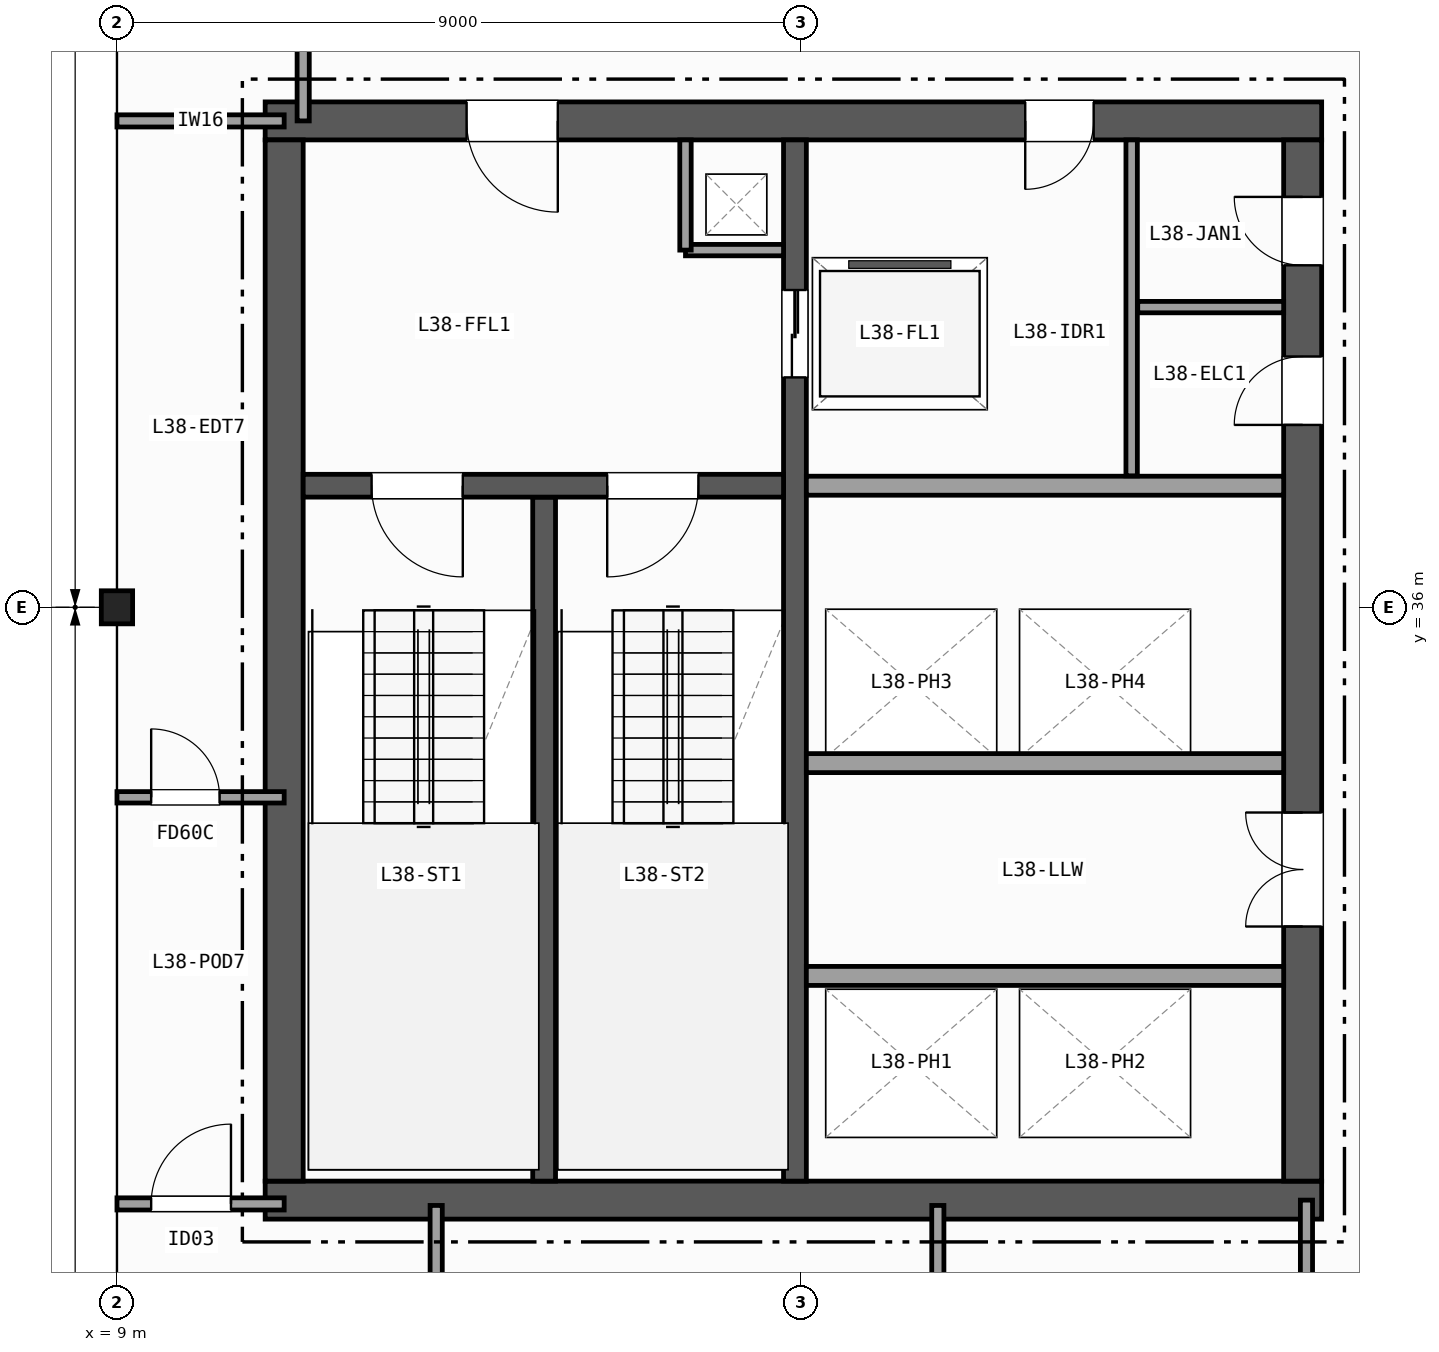
"""IFC4 building model, lengths in metres.
Left out: names, types, materials, properties, quantities, classifications, styles, units other than length and angle.
Written with IfcOpenShell. Run it as: python <this file> out.ifc"""

import sys

from ifc_helpers import new_model, si_unit, direction, frame, frame_2d, origin, origin_2d, place, context, subcontext, project, spatial, rectangle, i_section, extrude, element, fill, save


model = new_model("IFC4")
c1 = context("Model", 3, precision=1e-05, world=origin(), true_north=direction((0.0, 1.0)))
c2 = subcontext(c1, "Body", "Model", "MODEL_VIEW")
j1 = project(units=[si_unit("LENGTHUNIT", "METRE"), si_unit("PLANEANGLEUNIT", "RADIAN")], contexts=[c1])
p1 = place(None, origin())
s1 = spatial("IfcSite", under=j1, at=p1, CompositionType="ELEMENT")
p2 = place(p1, origin())
s2 = spatial("IfcBuilding", under=s1, at=p2, CompositionType="ELEMENT")
p3 = place(p2, frame((0.0, 0.0, 154.4)))
s3 = spatial("IfcBuildingStorey", under=s2, at=p3, CompositionType="ELEMENT", Elevation=154.4)
p4 = place(p3, frame((9.0, 36.0, 0.0), z_axis=(0.0, 0.0, 1.0), x_axis=(1.0, 0.0, 0.0)))
e1 = element("IfcColumn", 1, at=p4, inside=s3, PredefinedType="COLUMN", context=c2, shape_type="SweptSolid", body=[
    extrude(i_section(OverallWidth=0.412, OverallDepth=0.435, WebThickness=0.036, FlangeThickness=0.057, FilletRadius=0.015, at=origin_2d()), origin(), (0.0, 0.0, 1.0), 3.7),
])
p5 = place(p3, frame((10.95, 28.2, 0.0), z_axis=(0.0, 0.0, 1.0), x_axis=(1.0, 0.0, 0.0)))
e2 = element("IfcWall", 2, at=p5, inside=s3, PredefinedType="SHEAR", context=c2, shape_type="SweptSolid", body=[
    extrude(rectangle(XDim=13.9, YDim=0.5, at=frame_2d((6.95, 0.0))), origin(), (0.0, 0.0, 1.0), 3.42),
])
p6 = place(p3, frame((24.85, 42.4, 0.0), z_axis=(0.0, 0.0, 1.0), x_axis=(-1.0, 0.0, 0.0)))
e3 = element("IfcWall", 3, at=p6, inside=s3, PredefinedType="SHEAR", context=c2, shape_type="SweptSolid", body=[
    extrude(rectangle(XDim=13.9, YDim=0.5, at=frame_2d((6.95, 0.0))), origin(), (0.0, 0.0, 1.0), 3.42),
])
p7 = place(p6, frame((10.05, 0.0, 0.0)))
e4 = element("IfcOpeningElement", 4, at=p7, cuts=e3, PredefinedType="OPENING", context=c2, shape_type="SweptSolid", body=[
    extrude(rectangle(XDim=1.2, YDim=2.15, at=frame_2d((0.6, 1.075))), frame((0.0, 0.26, 0.0), z_axis=(0.0, -1.0, 0.0), x_axis=(1.0, 0.0, 0.0)), (0.0, 0.0, 1.0), 0.52),
])
p8 = place(p6, frame((3.0, 0.0, 0.0)))
e5 = element("IfcOpeningElement", 5, at=p8, cuts=e3, PredefinedType="OPENING", context=c2, shape_type="SweptSolid", body=[
    extrude(rectangle(XDim=0.9, YDim=2.1, at=frame_2d((0.45, 1.05))), frame((0.0, 0.26, 0.0), z_axis=(0.0, -1.0, 0.0), x_axis=(1.0, 0.0, 0.0)), (0.0, 0.0, 1.0), 0.52),
])
p9 = place(p3, frame((11.2, 42.15, 0.0), z_axis=(0.0, 0.0, 1.0), x_axis=(0.0, -1.0, 0.0)))
e6 = element("IfcWall", 6, at=p9, inside=s3, PredefinedType="SHEAR", context=c2, shape_type="SweptSolid", body=[
    extrude(rectangle(XDim=13.7, YDim=0.5, at=frame_2d((6.85, 0.0))), origin(), (0.0, 0.0, 1.0), 3.42),
])
p10 = place(p3, frame((24.6, 28.45, 0.0), z_axis=(0.0, 0.0, 1.0), x_axis=(0.0, 1.0, 0.0)))
e7 = element("IfcWall", 7, at=p10, inside=s3, PredefinedType="SHEAR", context=c2, shape_type="SweptSolid", body=[
    extrude(rectangle(XDim=13.7, YDim=0.5, at=frame_2d((6.85, 0.0))), origin(), (0.0, 0.0, 1.0), 3.42),
])
p11 = place(p10, frame((3.35, 0.0, 0.0)))
e8 = element("IfcOpeningElement", 8, at=p11, cuts=e7, PredefinedType="OPENING", context=c2, shape_type="SweptSolid", body=[
    extrude(rectangle(XDim=1.5, YDim=2.2, at=frame_2d((0.75, 1.1))), frame((0.0, 0.26, 0.0), z_axis=(0.0, -1.0, 0.0), x_axis=(1.0, 0.0, 0.0)), (0.0, 0.0, 1.0), 0.52),
])
p12 = place(p10, frame((9.95, 0.0, 0.0)))
e9 = element("IfcOpeningElement", 9, at=p12, cuts=e7, PredefinedType="OPENING", context=c2, shape_type="SweptSolid", body=[
    extrude(rectangle(XDim=0.9, YDim=2.1, at=frame_2d((0.45, 1.05))), frame((0.0, 0.26, 0.0), z_axis=(0.0, -1.0, 0.0), x_axis=(1.0, 0.0, 0.0)), (0.0, 0.0, 1.0), 0.52),
])
p13 = place(p10, frame((12.05, 0.0, 0.0)))
e10 = element("IfcOpeningElement", 10, at=p13, cuts=e7, PredefinedType="OPENING", context=c2, shape_type="SweptSolid", body=[
    extrude(rectangle(XDim=0.9, YDim=2.1, at=frame_2d((0.45, 1.05))), frame((0.0, 0.26, 0.0), z_axis=(0.0, -1.0, 0.0), x_axis=(1.0, 0.0, 0.0)), (0.0, 0.0, 1.0), 0.52),
])
p14 = place(p3, frame((14.62, 28.45, 0.0), z_axis=(0.0, 0.0, 1.0), x_axis=(0.0, 1.0, 0.0)))
e11 = element("IfcWall", 11, at=p14, inside=s3, PredefinedType="SHEAR", context=c2, shape_type="SweptSolid", body=[
    extrude(rectangle(XDim=9.0, YDim=0.3, at=frame_2d((4.5, 0.0))), origin(), (0.0, 0.0, 1.0), 3.42),
])
p15 = place(p3, frame((17.92, 42.15, 0.0), z_axis=(0.0, 0.0, 1.0), x_axis=(0.0, -1.0, 0.0)))
e12 = element("IfcWall", 12, at=p15, inside=s3, PredefinedType="SHEAR", context=c2, shape_type="SweptSolid", body=[
    extrude(rectangle(XDim=13.7, YDim=0.3, at=frame_2d((6.85, 0.0))), origin(), (0.0, 0.0, 1.0), 3.42),
])
p16 = place(p15, frame((1.975, 0.0, 0.0)))
e13 = element("IfcOpeningElement", 13, at=p16, cuts=e12, PredefinedType="OPENING", context=c2, shape_type="SweptSolid", body=[
    extrude(rectangle(XDim=1.15, YDim=2.15, at=frame_2d((0.575, 1.075))), frame((0.0, 0.16, 0.0), z_axis=(0.0, -1.0, 0.0), x_axis=(1.0, 0.0, 0.0)), (0.0, 0.0, 1.0), 0.32),
])
p17 = place(p3, frame((17.77, 37.6, 0.0), z_axis=(0.0, 0.0, 1.0), x_axis=(-1.0, 0.0, 0.0)))
e14 = element("IfcWall", 14, at=p17, inside=s3, PredefinedType="SHEAR", context=c2, shape_type="SweptSolid", body=[
    extrude(rectangle(XDim=6.32, YDim=0.3, at=frame_2d((3.16, 0.0))), origin(), (0.0, 0.0, 1.0), 3.42),
])
p18 = place(p17, frame((4.22, 0.0, 0.0)))
e15 = element("IfcOpeningElement", 15, at=p18, cuts=e14, PredefinedType="OPENING", context=c2, shape_type="SweptSolid", body=[
    extrude(rectangle(XDim=1.2, YDim=2.15, at=frame_2d((0.6, 1.075))), frame((0.0, 0.16, 0.0), z_axis=(0.0, -1.0, 0.0), x_axis=(1.0, 0.0, 0.0)), (0.0, 0.0, 1.0), 0.32),
])
p19 = place(p17, frame((1.12, 0.0, 0.0)))
e16 = element("IfcOpeningElement", 16, at=p19, cuts=e14, PredefinedType="OPENING", context=c2, shape_type="SweptSolid", body=[
    extrude(rectangle(XDim=1.2, YDim=2.15, at=frame_2d((0.6, 1.075))), frame((0.0, 0.16, 0.0), z_axis=(0.0, -1.0, 0.0), x_axis=(1.0, 0.0, 0.0)), (0.0, 0.0, 1.0), 0.32),
])
p20 = place(p3, frame((16.48, 40.7, 0.0), z_axis=(0.0, 0.0, 1.0), x_axis=(1.0, 0.0, 0.0)))
e17 = element("IfcWall", 17, at=p20, inside=s3, PredefinedType="PARTITIONING", context=c2, shape_type="SweptSolid", body=[
    extrude(rectangle(XDim=1.29, YDim=0.15, at=frame_2d((0.645, 0.0))), origin(), (0.0, 0.0, 1.0), 3.42),
])
p21 = place(p3, frame((16.48, 40.7, 0.0), z_axis=(0.0, 0.0, 1.0), x_axis=(0.0, 1.0, 0.0)))
e18 = element("IfcWall", 18, at=p21, inside=s3, PredefinedType="PARTITIONING", context=c2, shape_type="SweptSolid", body=[
    extrude(rectangle(XDim=1.45, YDim=0.15, at=frame_2d((0.725, 0.0))), origin(), (0.0, 0.0, 1.0), 3.42),
])
for number, where, z_axis, x_axis in (
    (19, (18.07, 37.6, 0.0), (0.0, 0.0, 1.0), (1.0, 0.0, 0.0)),
    (20, (18.07, 31.15, 0.0), (0.0, 0.0, 1.0), (1.0, 0.0, 0.0)),
    (21, (24.35, 33.95, 0.0), (0.0, 0.0, 1.0), (-1.0, 0.0, 0.0)),
):
    element("IfcWall", number, at=place(p3, frame(where, z_axis=z_axis, x_axis=x_axis)), inside=s3, PredefinedType="PARTITIONING", context=c2, shape_type="SweptSolid", body=[
        extrude(rectangle(XDim=6.28, YDim=0.25, at=frame_2d((3.14, 0.0))), origin(), (0.0, 0.0, 1.0), 3.42),
    ])
p22 = place(p3, frame((22.35, 37.73, 0.0), z_axis=(0.0, 0.0, 1.0), x_axis=(0.0, 1.0, 0.0)))
e22 = element("IfcWall", 22, at=p22, inside=s3, PredefinedType="PARTITIONING", context=c2, shape_type="SweptSolid", body=[
    extrude(rectangle(XDim=4.42, YDim=0.15, at=frame_2d((2.21, 0.0))), origin(), (0.0, 0.0, 1.0), 3.42),
])
p23 = place(p3, frame((22.43, 39.95, 0.0), z_axis=(0.0, 0.0, 1.0), x_axis=(1.0, 0.0, 0.0)))
e23 = element("IfcWall", 23, at=p23, inside=s3, PredefinedType="PARTITIONING", context=c2, shape_type="SweptSolid", body=[
    extrude(rectangle(XDim=1.92, YDim=0.15, at=frame_2d((0.96, 0.0))), origin(), (0.0, 0.0, 1.0), 3.42),
])
p24 = place(p3, frame((9.0, 28.15, 0.0), z_axis=(0.0, 0.0, 1.0), x_axis=(1.0, 0.0, 0.0)))
e24 = element("IfcWall", 24, at=p24, inside=s3, PredefinedType="PARTITIONING", context=c2, shape_type="SweptSolid", body=[
    extrude(rectangle(XDim=2.2, YDim=0.16, at=frame_2d((1.1, 0.0))), origin(), (0.0, 0.0, 1.0), 2.634),
])
p25 = place(p24, frame((0.45, 0.0, 0.0)))
e25 = element("IfcOpeningElement", 25, at=p25, cuts=e24, PredefinedType="OPENING", context=c2, shape_type="SweptSolid", body=[
    extrude(rectangle(XDim=1.05, YDim=2.15, at=frame_2d((0.525, 1.075))), frame((0.0, 0.09, 0.0), z_axis=(0.0, -1.0, 0.0), x_axis=(1.0, 0.0, 0.0)), (0.0, 0.0, 1.0), 0.18),
])
p26 = place(p3, frame((9.0, 42.4, 0.0), z_axis=(0.0, 0.0, 1.0), x_axis=(1.0, 0.0, 0.0)))
e26 = element("IfcWall", 26, at=p26, inside=s3, PredefinedType="PARTITIONING", context=c2, shape_type="SweptSolid", body=[
    extrude(rectangle(XDim=2.2, YDim=0.16, at=frame_2d((1.1, 0.0))), origin(), (0.0, 0.0, 1.0), 2.634),
])
p27 = place(p3, frame((11.45, 42.4, 0.0), z_axis=(0.0, 0.0, 1.0), x_axis=(0.0, 1.0, 0.0)))
e27 = element("IfcWall", 27, at=p27, inside=s3, PredefinedType="PARTITIONING", context=c2, shape_type="SweptSolid", body=[
    extrude(rectangle(XDim=2.1, YDim=0.16, at=frame_2d((1.05, 0.0))), origin(), (0.0, 0.0, 1.0), 3.42),
])
p28 = place(p3, frame((9.0, 33.5, 0.0), z_axis=(0.0, 0.0, 1.0), x_axis=(1.0, 0.0, 0.0)))
e28 = element("IfcWall", 28, at=p28, inside=s3, PredefinedType="PARTITIONING", context=c2, shape_type="SweptSolid", body=[
    extrude(rectangle(XDim=2.2, YDim=0.15, at=frame_2d((1.1, 0.0))), origin(), (0.0, 0.0, 1.0), 2.634),
])
p29 = place(p28, frame((0.45, 0.0, 0.0)))
e29 = element("IfcOpeningElement", 29, at=p29, cuts=e28, PredefinedType="OPENING", context=c2, shape_type="SweptSolid", body=[
    extrude(rectangle(XDim=0.9, YDim=2.1, at=frame_2d((0.45, 1.05))), frame((0.0, 0.085, 0.0), z_axis=(0.0, -1.0, 0.0), x_axis=(1.0, 0.0, 0.0)), (0.0, 0.0, 1.0), 0.17),
])
p30 = place(p3, frame((24.65, 9.0, 0.0), z_axis=(0.0, 0.0, 1.0), x_axis=(0.0, 1.0, 0.0)))
e30 = element("IfcWall", 30, at=p30, inside=s3, PredefinedType="PARTITIONING", context=c2, shape_type="SweptSolid", body=[
    extrude(rectangle(XDim=19.2, YDim=0.16, at=frame_2d((9.6, 0.0))), origin(), (0.0, 0.0, 1.0), 2.634),
])
p31 = place(p30, frame((12.2, 0.0, 0.0)))
e31 = element("IfcOpeningElement", 31, at=p31, cuts=e30, PredefinedType="OPENING", context=c2, shape_type="SweptSolid", body=[
    extrude(rectangle(XDim=0.86, YDim=2.05, at=frame_2d((0.43, 1.025))), frame((0.0, 0.09, 0.0), z_axis=(0.0, -1.0, 0.0), x_axis=(1.0, 0.0, 0.0)), (0.0, 0.0, 1.0), 0.18),
])
p32 = place(p30, frame((4.2, 0.0, 0.0)))
e32 = element("IfcOpeningElement", 32, at=p32, cuts=e30, PredefinedType="OPENING", context=c2, shape_type="SweptSolid", body=[
    extrude(rectangle(XDim=0.95, YDim=2.1, at=frame_2d((0.475, 1.05))), frame((0.0, 0.09, 0.0), z_axis=(0.0, -1.0, 0.0), x_axis=(1.0, 0.0, 0.0)), (0.0, 0.0, 1.0), 0.18),
])
p33 = place(p3, frame((13.2, 18.0, 0.0), z_axis=(0.0, 0.0, 1.0), x_axis=(0.0, 1.0, 0.0)))
e33 = element("IfcWall", 33, at=p33, inside=s3, PredefinedType="PARTITIONING", context=c2, shape_type="SweptSolid", body=[
    extrude(rectangle(XDim=10.13, YDim=0.16, at=frame_2d((5.065, 0.0))), origin(), (0.0, 0.0, 1.0), 2.789),
])
p34 = place(p33, frame((2.5, 0.0, 0.0)))
e34 = element("IfcOpeningElement", 34, at=p34, cuts=e33, PredefinedType="OPENING", context=c2, shape_type="SweptSolid", body=[
    extrude(rectangle(XDim=1.0, YDim=2.1, at=frame_2d((0.5, 1.05))), frame((0.0, 0.09, 0.0), z_axis=(0.0, -1.0, 0.0), x_axis=(1.0, 0.0, 0.0)), (0.0, 0.0, 1.0), 0.18),
])
p35 = place(p3, frame((19.8, 18.0, 0.0), z_axis=(0.0, 0.0, 1.0), x_axis=(0.0, 1.0, 0.0)))
e35 = element("IfcWall", 35, at=p35, inside=s3, PredefinedType="PARTITIONING", context=c2, shape_type="SweptSolid", body=[
    extrude(rectangle(XDim=10.13, YDim=0.16, at=frame_2d((5.065, 0.0))), origin(), (0.0, 0.0, 1.0), 2.789),
])
p36 = place(p35, frame((2.5, 0.0, 0.0)))
e36 = element("IfcOpeningElement", 36, at=p36, cuts=e35, PredefinedType="OPENING", context=c2, shape_type="SweptSolid", body=[
    extrude(rectangle(XDim=1.05, YDim=2.15, at=frame_2d((0.525, 1.075))), frame((0.0, 0.09, 0.0), z_axis=(0.0, -1.0, 0.0), x_axis=(1.0, 0.0, 0.0)), (0.0, 0.0, 1.0), 0.18),
])
p37 = place(p18, origin())
e37 = element("IfcDoor", 37, at=p37, inside=s3, OperationType="SINGLE_SWING_LEFT", PredefinedType="DOOR", context=c2, shape_type="SweptSolid", body=[
    extrude(rectangle(XDim=1.2, YDim=2.15, at=frame_2d((0.6, 1.075))), frame((0.0, 0.025, 0.0), z_axis=(0.0, -1.0, 0.0), x_axis=(1.0, 0.0, 0.0)), (0.0, 0.0, 1.0), 0.05),
])
fill(e15, e37)
p38 = place(p19, origin())
e38 = element("IfcDoor", 38, at=p38, inside=s3, OperationType="SINGLE_SWING_RIGHT", PredefinedType="DOOR", context=c2, shape_type="SweptSolid", body=[
    extrude(rectangle(XDim=1.2, YDim=2.15, at=frame_2d((0.6, 1.075))), frame((0.0, 0.025, 0.0), z_axis=(0.0, -1.0, 0.0), x_axis=(1.0, 0.0, 0.0)), (0.0, 0.0, 1.0), 0.05),
])
fill(e16, e38)
p39 = place(p11, origin())
e39 = element("IfcDoor", 39, at=p39, inside=s3, OperationType="DOUBLE_DOOR_SINGLE_SWING", PredefinedType="DOOR", context=c2, shape_type="SweptSolid", body=[
    extrude(rectangle(XDim=1.5, YDim=2.2, at=frame_2d((0.75, 1.1))), frame((0.0, 0.025, 0.0), z_axis=(0.0, -1.0, 0.0), x_axis=(1.0, 0.0, 0.0)), (0.0, 0.0, 1.0), 0.05),
])
fill(e8, e39)
p40 = place(p7, origin())
e40 = element("IfcDoor", 40, at=p40, inside=s3, OperationType="SINGLE_SWING_LEFT", PredefinedType="DOOR", context=c2, shape_type="SweptSolid", body=[
    extrude(rectangle(XDim=1.2, YDim=2.15, at=frame_2d((0.6, 1.075))), frame((0.0, 0.025, 0.0), z_axis=(0.0, -1.0, 0.0), x_axis=(1.0, 0.0, 0.0)), (0.0, 0.0, 1.0), 0.05),
])
fill(e4, e40)
p41 = place(p12, origin())
e41 = element("IfcDoor", 41, at=p41, inside=s3, OperationType="SINGLE_SWING_LEFT", PredefinedType="DOOR", context=c2, shape_type="SweptSolid", body=[
    extrude(rectangle(XDim=0.9, YDim=2.1, at=frame_2d((0.45, 1.05))), frame((0.0, 0.025, 0.0), z_axis=(0.0, -1.0, 0.0), x_axis=(1.0, 0.0, 0.0)), (0.0, 0.0, 1.0), 0.05),
])
fill(e9, e41)
p42 = place(p8, origin())
e42 = element("IfcDoor", 42, at=p42, inside=s3, OperationType="SINGLE_SWING_RIGHT", PredefinedType="DOOR", context=c2, shape_type="SweptSolid", body=[
    extrude(rectangle(XDim=0.9, YDim=2.1, at=frame_2d((0.45, 1.05))), frame((0.0, 0.025, 0.0), z_axis=(0.0, -1.0, 0.0), x_axis=(1.0, 0.0, 0.0)), (0.0, 0.0, 1.0), 0.05),
])
fill(e5, e42)
p43 = place(p13, origin())
e43 = element("IfcDoor", 43, at=p43, inside=s3, OperationType="SINGLE_SWING_RIGHT", PredefinedType="DOOR", context=c2, shape_type="SweptSolid", body=[
    extrude(rectangle(XDim=0.9, YDim=2.1, at=frame_2d((0.45, 1.05))), frame((0.0, 0.025, 0.0), z_axis=(0.0, -1.0, 0.0), x_axis=(1.0, 0.0, 0.0)), (0.0, 0.0, 1.0), 0.05),
])
fill(e10, e43)
p44 = place(p16, origin())
e44 = element("IfcDoor", 44, at=p44, inside=s3, OperationType="DOUBLE_DOOR_SLIDING", PredefinedType="DOOR", context=c2, shape_type="SweptSolid", body=[
    extrude(rectangle(XDim=1.15, YDim=2.15, at=frame_2d((0.575, 1.075))), frame((0.0, 0.025, 0.0), z_axis=(0.0, -1.0, 0.0), x_axis=(1.0, 0.0, 0.0)), (0.0, 0.0, 1.0), 0.05),
])
fill(e13, e44)
p45 = place(p25, origin())
e45 = element("IfcDoor", 45, at=p45, inside=s3, OperationType="SINGLE_SWING_RIGHT", PredefinedType="DOOR", context=c2, shape_type="SweptSolid", body=[
    extrude(rectangle(XDim=1.05, YDim=2.15, at=frame_2d((0.525, 1.075))), frame((0.0, 0.025, 0.0), z_axis=(0.0, -1.0, 0.0), x_axis=(1.0, 0.0, 0.0)), (0.0, 0.0, 1.0), 0.05),
])
fill(e25, e45)
p46 = place(p29, origin())
e46 = element("IfcDoor", 46, at=p46, inside=s3, OperationType="SINGLE_SWING_LEFT", PredefinedType="DOOR", context=c2, shape_type="SweptSolid", body=[
    extrude(rectangle(XDim=0.9, YDim=2.1, at=frame_2d((0.45, 1.05))), frame((0.0, 0.025, 0.0), z_axis=(0.0, -1.0, 0.0), x_axis=(1.0, 0.0, 0.0)), (0.0, 0.0, 1.0), 0.05),
])
fill(e29, e46)
save(model, sys.argv[1])
